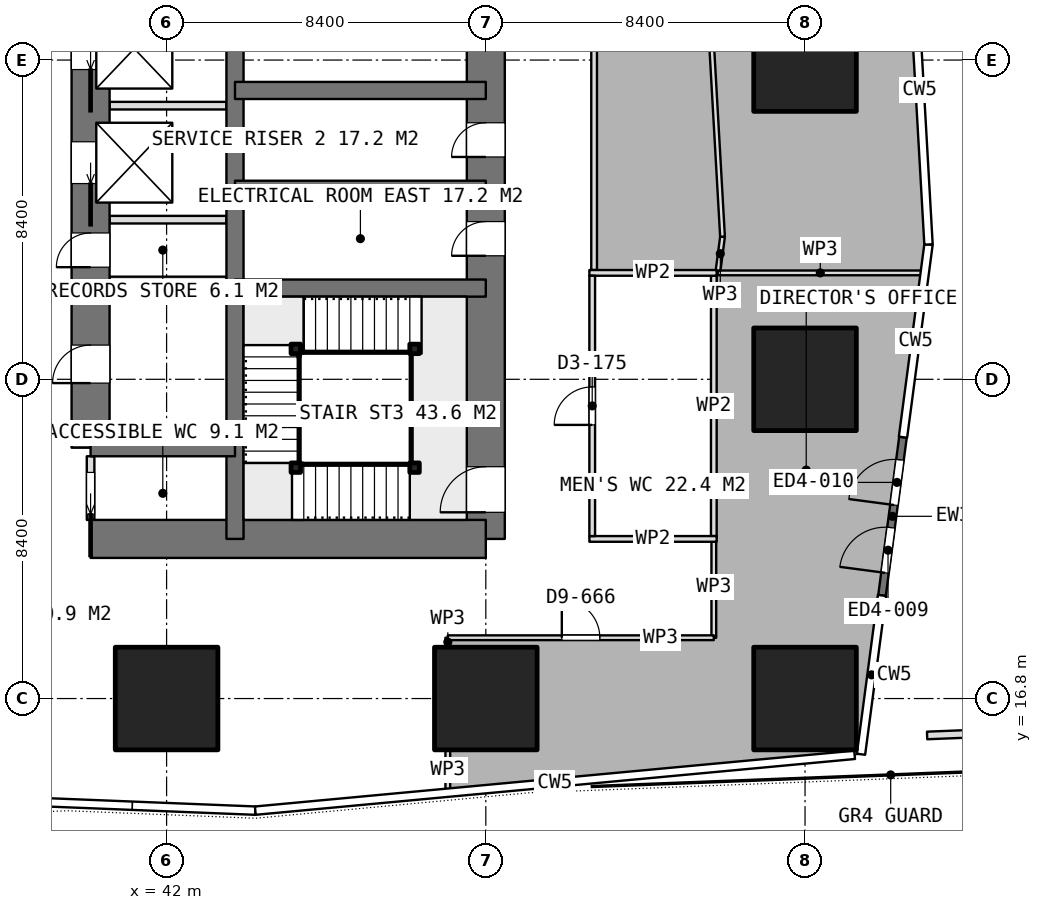
"""IFC4 building model, lengths in metres.
Left out: names, types, materials, properties, quantities, classifications, styles, units other than length and angle.
Written with IfcOpenShell. Run it as: python <this file> out.ifc"""

import sys

from ifc_helpers import new_model, si_unit, direction, frame, frame_2d, origin, origin_2d, place, context, subcontext, project, spatial, rectangle, extrude, element, fill, save


model = new_model("IFC4")
c1 = context("Model", 3, precision=1e-05, world=origin(), true_north=direction((0.0, 1.0)))
c2 = subcontext(c1, "Body", "Model", "MODEL_VIEW")
j1 = project(units=[si_unit("LENGTHUNIT", "METRE"), si_unit("PLANEANGLEUNIT", "RADIAN")], contexts=[c1])
p1 = place(None, origin())
s1 = spatial("IfcSite", under=j1, at=p1, CompositionType="ELEMENT")
p2 = place(p1, origin())
s2 = spatial("IfcBuilding", under=s1, at=p2, CompositionType="ELEMENT")
p3 = place(p2, frame((0.0, 0.0, 168.2)))
s3 = spatial("IfcBuildingStorey", under=s2, at=p3, CompositionType="ELEMENT", Elevation=168.2)
p4 = place(p3, frame((40.0, 21.0, 0.0), z_axis=(0.0, 0.0, 1.0), x_axis=(1.0, 0.0, 0.0)))
e1 = element("IfcWall", 1, at=p4, inside=s3, PredefinedType="SHEAR", context=c2, shape_type="SweptSolid", body=[
    extrude(rectangle(XDim=10.4, YDim=1.0, at=frame_2d((5.2, 0.0))), origin(), (0.0, 0.0, 1.0), 4.5),
])
p5 = place(p3, frame((50.4, 21.0, 0.0), z_axis=(0.0, 0.0, 1.0), x_axis=(0.0, 1.0, 0.0)))
e2 = element("IfcWall", 2, at=p5, inside=s3, PredefinedType="SHEAR", context=c2, shape_type="SweptSolid", body=[
    extrude(rectangle(XDim=25.2, YDim=1.0, at=frame_2d((12.6, 0.0))), origin(), (0.0, 0.0, 1.0), 4.5),
])
p6 = place(p5, frame((16.2, 0.0, 0.0)))
e3 = element("IfcOpeningElement", 3, at=p6, cuts=e2, PredefinedType="OPENING", context=c2, shape_type="SweptSolid", body=[
    extrude(rectangle(XDim=1.2, YDim=2.1, at=frame_2d((0.6, 1.05))), frame((0.0, 0.51, 0.0), z_axis=(0.0, -1.0, 0.0), x_axis=(1.0, 0.0, 0.0)), (0.0, 0.0, 1.0), 1.02),
])
p7 = place(p5, frame((10.05, 0.0, 0.0)))
e4 = element("IfcOpeningElement", 4, at=p7, cuts=e2, PredefinedType="OPENING", context=c2, shape_type="SweptSolid", body=[
    extrude(rectangle(XDim=0.9, YDim=2.1, at=frame_2d((0.45, 1.05))), frame((0.0, 0.51, 0.0), z_axis=(0.0, -1.0, 0.0), x_axis=(1.0, 0.0, 0.0)), (0.0, 0.0, 1.0), 1.02),
])
p8 = place(p5, frame((7.45, 0.0, 0.0)))
e5 = element("IfcOpeningElement", 5, at=p8, cuts=e2, PredefinedType="OPENING", context=c2, shape_type="SweptSolid", body=[
    extrude(rectangle(XDim=0.9, YDim=2.1, at=frame_2d((0.45, 1.05))), frame((0.0, 0.51, 0.0), z_axis=(0.0, -1.0, 0.0), x_axis=(1.0, 0.0, 0.0)), (0.0, 0.0, 1.0), 1.02),
])
p9 = place(p5, frame((0.7, 0.0, 0.0)))
e6 = element("IfcOpeningElement", 6, at=p9, cuts=e2, PredefinedType="OPENING", context=c2, shape_type="SweptSolid", body=[
    extrude(rectangle(XDim=1.2, YDim=2.1, at=frame_2d((0.6, 1.05))), frame((0.0, 0.51, 0.0), z_axis=(0.0, -1.0, 0.0), x_axis=(1.0, 0.0, 0.0)), (0.0, 0.0, 1.0), 1.02),
])
p10 = place(p3, frame((43.8, 21.0, 0.0), z_axis=(0.0, 0.0, 1.0), x_axis=(0.0, 1.0, 0.0)))
e7 = element("IfcWall", 7, at=p10, inside=s3, PredefinedType="SHEAR", context=c2, shape_type="SweptSolid", body=[
    extrude(rectangle(XDim=25.2, YDim=0.45, at=frame_2d((12.6, 0.0))), origin(), (0.0, 0.0, 1.0), 4.5),
])
p11 = place(p3, frame((40.0, 23.4, 0.0), z_axis=(0.0, 0.0, 1.0), x_axis=(0.0, 1.0, 0.0)))
e8 = element("IfcWall", 8, at=p11, inside=s3, PredefinedType="SHEAR", context=c2, shape_type="SweptSolid", body=[
    extrude(rectangle(XDim=18.0, YDim=1.0, at=frame_2d((9.0, 0.0))), origin(), (0.0, 0.0, 1.0), 4.5),
])
p12 = place(p11, frame((1.7, 0.0, 0.0)))
e9 = element("IfcOpeningElement", 9, at=p12, cuts=e8, PredefinedType="OPENING", context=c2, shape_type="SweptSolid", body=[
    extrude(rectangle(XDim=1.0, YDim=2.1, at=frame_2d((0.5, 1.05))), frame((0.0, 0.51, 0.0), z_axis=(0.0, -1.0, 0.0), x_axis=(1.0, 0.0, 0.0)), (0.0, 0.0, 1.0), 1.02),
])
p13 = place(p11, frame((4.75, 0.0, 0.0)))
e10 = element("IfcOpeningElement", 10, at=p13, cuts=e8, PredefinedType="OPENING", context=c2, shape_type="SweptSolid", body=[
    extrude(rectangle(XDim=0.9, YDim=2.1, at=frame_2d((0.45, 1.05))), frame((0.0, 0.51, 0.0), z_axis=(0.0, -1.0, 0.0), x_axis=(1.0, 0.0, 0.0)), (0.0, 0.0, 1.0), 1.02),
])
p14 = place(p11, frame((6.95, 0.0, 0.0)))
e11 = element("IfcOpeningElement", 11, at=p14, cuts=e8, PredefinedType="OPENING", context=c2, shape_type="SweptSolid", body=[
    extrude(rectangle(XDim=1.1, YDim=2.1, at=frame_2d((0.55, 1.05))), frame((0.0, 0.51, 0.0), z_axis=(0.0, -1.0, 0.0), x_axis=(1.0, 0.0, 0.0)), (0.0, 0.0, 1.0), 1.02),
])
p15 = place(p11, frame((9.95, 0.0, 0.0)))
e12 = element("IfcOpeningElement", 12, at=p15, cuts=e8, PredefinedType="OPENING", context=c2, shape_type="SweptSolid", body=[
    extrude(rectangle(XDim=1.1, YDim=2.1, at=frame_2d((0.55, 1.05))), frame((0.0, 0.51, 0.0), z_axis=(0.0, -1.0, 0.0), x_axis=(1.0, 0.0, 0.0)), (0.0, 0.0, 1.0), 1.02),
])
p16 = place(p3, frame((40.0, 23.4, 0.0), z_axis=(0.0, 0.0, 1.0), x_axis=(1.0, 0.0, 0.0)))
e13 = element("IfcWall", 13, at=p16, inside=s3, PredefinedType="SHEAR", context=c2, shape_type="SweptSolid", body=[
    extrude(rectangle(XDim=3.8, YDim=0.45, at=frame_2d((1.9, 0.0))), origin(), (0.0, 0.0, 1.0), 4.5),
])
for number, where, z_axis, x_axis in (
    (14, (43.8, 27.6, 0.0), (0.0, 0.0, 1.0), (1.0, 0.0, 0.0)),
    (15, (43.8, 30.2, 0.0), (0.0, 0.0, 1.0), (1.0, 0.0, 0.0)),
    (16, (43.8, 32.8, 0.0), (0.0, 0.0, 1.0), (1.0, 0.0, 0.0)),
):
    element("IfcWall", number, at=place(p3, frame(where, z_axis=z_axis, x_axis=x_axis)), inside=s3, PredefinedType="SHEAR", context=c2, shape_type="SweptSolid", body=[
        extrude(rectangle(XDim=6.6, YDim=0.45, at=frame_2d((3.3, 0.0))), origin(), (0.0, 0.0, 1.0), 4.5),
    ])
for number, where, z_axis, x_axis in (
    (17, (42.0, 16.8, 0.0), (0.0, 0.0, 1.0), (1.0, 0.0, 0.0)),
    (18, (50.4, 16.8, 0.0), (0.0, 0.0, 1.0), (1.0, 0.0, 0.0)),
    (19, (58.8, 16.8, 0.0), (0.0, 0.0, 1.0), (1.0, 0.0, 0.0)),
    (20, (58.8, 25.2, 0.0), (0.0, 0.0, 1.0), (1.0, 0.0, 0.0)),
    (21, (58.8, 33.6, 0.0), (0.0, 0.0, 1.0), (1.0, 0.0, 0.0)),
):
    element("IfcColumn", number, at=place(p3, frame(where, z_axis=z_axis, x_axis=x_axis)), inside=s3, PredefinedType="COLUMN", context=c2, shape_type="SweptSolid", body=[
        extrude(rectangle(XDim=2.7, YDim=2.7, at=origin_2d()), origin(), (0.0, 0.0, 1.0), 4.5),
    ])
p17 = place(p3, frame((60.826, 19.513, 0.0), z_axis=(0.0, 0.0, 1.0), x_axis=(0.131307007814, 0.991341752222, 0.0)))
e22 = element("IfcWall", 22, at=p17, inside=s3, PredefinedType="SOLIDWALL", context=c2, shape_type="SweptSolid", body=[
    extrude(rectangle(XDim=4.2, YDim=0.2, at=frame_2d((2.1, 0.0))), origin(), (0.0, 0.0, 1.0), 4.25),
])
p18 = place(p17, frame((0.6, 0.0, 0.0)))
e23 = element("IfcOpeningElement", 23, at=p18, cuts=e22, PredefinedType="OPENING", context=c2, shape_type="SweptSolid", body=[
    extrude(rectangle(XDim=1.2, YDim=2.4, at=frame_2d((0.6, 1.2))), frame((0.0, 0.11, 0.0), z_axis=(0.0, -1.0, 0.0), x_axis=(1.0, 0.0, 0.0)), (0.0, 0.0, 1.0), 0.22),
])
p19 = place(p17, frame((2.4, 0.0, 0.0)))
e24 = element("IfcOpeningElement", 24, at=p19, cuts=e22, PredefinedType="OPENING", context=c2, shape_type="SweptSolid", body=[
    extrude(rectangle(XDim=1.2, YDim=2.4, at=frame_2d((0.6, 1.2))), frame((0.0, 0.11, 0.0), z_axis=(0.0, -1.0, 0.0), x_axis=(1.0, 0.0, 0.0)), (0.0, 0.0, 1.0), 0.22),
])
p20 = place(p3, frame((62.013, 15.829, 0.0), z_axis=(0.0, 0.0, 1.0), x_axis=(0.999242772143, 0.038908640685, 0.0)))
e25 = element("IfcWall", 25, at=p20, inside=s3, PredefinedType="USERDEFINED", context=c2, shape_type="SweptSolid", body=[
    extrude(rectangle(XDim=5.955, YDim=0.2, at=frame_2d((2.977, 0.0))), origin(), (0.0, 0.0, 1.0), 0.6),
])
for number, where, z_axis, x_axis in (
    (26, (40.5, 29.4, 0.0), (0.0, 0.0, 1.0), (1.0, 0.0, 0.0)),
    (27, (40.5, 32.4, 0.0), (0.0, 0.0, 1.0), (1.0, 0.0, 0.0)),
):
    element("IfcWall", number, at=place(p3, frame(where, z_axis=z_axis, x_axis=x_axis)), inside=s3, PredefinedType="PARTITIONING", context=c2, shape_type="SweptSolid", body=[
        extrude(rectangle(XDim=3.075, YDim=0.2, at=frame_2d((1.538, 0.0))), origin(), (0.0, 0.0, 1.0), 4.25),
    ])
p21 = place(p3, frame((40.0, 21.5, 0.0), z_axis=(0.0, 0.0, 1.0), x_axis=(0.0, 1.0, 0.0)))
e28 = element("IfcWall", 28, at=p21, inside=s3, PredefinedType="PARTITIONING", context=c2, shape_type="SweptSolid", body=[
    extrude(rectangle(XDim=1.675, YDim=0.2, at=frame_2d((0.837, 0.0))), origin(), (0.0, 0.0, 1.0), 4.25),
])
p22 = place(p21, frame((0.15, 0.0, 0.0)))
e29 = element("IfcOpeningElement", 29, at=p22, cuts=e28, PredefinedType="OPENING", context=c2, shape_type="SweptSolid", body=[
    extrude(rectangle(XDim=1.1, YDim=2.1, at=frame_2d((0.55, 1.05))), frame((0.0, 0.11, 0.0), z_axis=(0.0, -1.0, 0.0), x_axis=(1.0, 0.0, 0.0)), (0.0, 0.0, 1.0), 0.22),
])
p23 = place(p3, frame((40.5, 27.8, 0.0), z_axis=(0.0, 0.0, 1.0), x_axis=(1.0, 0.0, 0.0)))
e30 = element("IfcWall", 30, at=p23, inside=s3, PredefinedType="PARTITIONING", context=c2, shape_type="SweptSolid", body=[
    extrude(rectangle(XDim=3.075, YDim=0.2, at=frame_2d((1.538, 0.0))), origin(), (0.0, 0.0, 1.0), 4.25),
])
for number, where, z_axis, x_axis in (
    (31, (53.125, 21.0, 0.0), (0.0, 0.0, 1.0), (1.0, 0.0, 0.0)),
    (32, (53.125, 28.0, 0.0), (0.0, 0.0, 1.0), (1.0, 0.0, 0.0)),
):
    element("IfcWall", number, at=place(p3, frame(where, z_axis=z_axis, x_axis=x_axis)), inside=s3, PredefinedType="PARTITIONING", context=c2, shape_type="SweptSolid", body=[
        extrude(rectangle(XDim=3.35, YDim=0.15, at=frame_2d((1.675, 0.0))), origin(), (0.0, 0.0, 1.0), 4.25),
    ])
p24 = place(p3, frame((53.2, 21.075, 0.0), z_axis=(0.0, 0.0, 1.0), x_axis=(0.0, 1.0, 0.0)))
e33 = element("IfcWall", 33, at=p24, inside=s3, PredefinedType="PARTITIONING", context=c2, shape_type="SweptSolid", body=[
    extrude(rectangle(XDim=6.85, YDim=0.15, at=frame_2d((3.425, 0.0))), origin(), (0.0, 0.0, 1.0), 4.25),
])
p25 = place(p24, frame((2.925, 0.0, 0.0)))
e34 = element("IfcOpeningElement", 34, at=p25, cuts=e33, PredefinedType="OPENING", context=c2, shape_type="SweptSolid", body=[
    extrude(rectangle(XDim=1.0, YDim=2.1, at=frame_2d((0.5, 1.05))), frame((0.0, 0.085, 0.0), z_axis=(0.0, -1.0, 0.0), x_axis=(1.0, 0.0, 0.0)), (0.0, 0.0, 1.0), 0.17),
])
p26 = place(p3, frame((56.4, 21.075, 0.0), z_axis=(0.0, 0.0, 1.0), x_axis=(0.0, 1.0, 0.0)))
e35 = element("IfcWall", 35, at=p26, inside=s3, PredefinedType="PARTITIONING", context=c2, shape_type="SweptSolid", body=[
    extrude(rectangle(XDim=6.85, YDim=0.15, at=frame_2d((3.425, 0.0))), origin(), (0.0, 0.0, 1.0), 4.25),
])
p27 = place(p3, frame((56.4, 18.4, 0.0), z_axis=(0.0, 0.0, 1.0), x_axis=(0.0, 1.0, 0.0)))
e36 = element("IfcWall", 36, at=p27, inside=s3, PredefinedType="PARTITIONING", context=c2, shape_type="SweptSolid", body=[
    extrude(rectangle(XDim=2.675, YDim=0.125, at=frame_2d((1.337, 0.0))), origin(), (0.0, 0.0, 1.0), 4.25),
])
p28 = place(p3, frame((56.503, 28.0, 0.0), z_axis=(0.0, 0.0, 1.0), x_axis=(1.0, 0.0, 0.0)))
e37 = element("IfcWall", 37, at=p28, inside=s3, PredefinedType="PARTITIONING", context=c2, shape_type="SweptSolid", body=[
    extrude(rectangle(XDim=5.397, YDim=0.125, at=frame_2d((2.698, 0.0))), origin(), (0.0, 0.0, 1.0), 4.25),
])
p29 = place(p3, frame((49.4, 14.402, 0.0), z_axis=(0.0, 0.0, 1.0), x_axis=(0.0, 1.0, 0.0)))
e38 = element("IfcWall", 38, at=p29, inside=s3, PredefinedType="PARTITIONING", context=c2, shape_type="SweptSolid", body=[
    extrude(rectangle(XDim=1.028, YDim=0.125, at=frame_2d((0.514, 0.0))), origin(), (0.0, 0.0, 1.0), 4.25),
])
p30 = place(p3, frame((49.4, 18.17, 0.0), z_axis=(0.0, 0.0, 1.0), x_axis=(0.0, 1.0, 0.0)))
e39 = element("IfcWall", 39, at=p30, inside=s3, PredefinedType="PARTITIONING", context=c2, shape_type="SweptSolid", body=[
    extrude(rectangle(XDim=0.23, YDim=0.125, at=frame_2d((0.115, 0.0))), origin(), (0.0, 0.0, 1.0), 4.25),
])
p31 = place(p3, frame((49.4, 18.4, 0.0), z_axis=(0.0, 0.0, 1.0), x_axis=(1.0, 0.0, 0.0)))
e40 = element("IfcWall", 40, at=p31, inside=s3, PredefinedType="PARTITIONING", context=c2, shape_type="SweptSolid", body=[
    extrude(rectangle(XDim=7.0, YDim=0.125, at=frame_2d((3.5, 0.0))), origin(), (0.0, 0.0, 1.0), 4.25),
])
p32 = place(p31, frame((3.0, 0.0, 0.0)))
e41 = element("IfcOpeningElement", 41, at=p32, cuts=e40, PredefinedType="OPENING", context=c2, shape_type="SweptSolid", body=[
    extrude(rectangle(XDim=1.0, YDim=2.1, at=frame_2d((0.5, 1.05))), frame((0.0, 0.073, 0.0), z_axis=(0.0, -1.0, 0.0), x_axis=(1.0, 0.0, 0.0)), (0.0, 0.0, 1.0), 0.145),
])
p33 = place(p3, frame((56.512, 28.062, 0.0), z_axis=(0.0, 0.0, 1.0), x_axis=(0.130433380751, 0.991457075816, 0.0)))
e42 = element("IfcWall", 42, at=p33, inside=s3, PredefinedType="PARTITIONING", context=c2, shape_type="SweptSolid", body=[
    extrude(rectangle(XDim=0.896, YDim=0.125, at=frame_2d((0.448, 0.0))), origin(), (0.0, 0.0, 1.0), 4.25),
])
p34 = place(p3, frame((56.629, 28.951, 0.0), z_axis=(0.0, 0.0, 1.0), x_axis=(-0.056721758154, 0.998390025066, 0.0)))
e43 = element("IfcWall", 43, at=p34, inside=s3, PredefinedType="PARTITIONING", context=c2, shape_type="SweptSolid", body=[
    extrude(rectangle(XDim=6.168, YDim=0.125, at=frame_2d((3.084, 0.0))), origin(), (0.0, 0.0, 1.0), 4.25),
])
p35 = place(p3, frame((53.25, 28.075, 0.0), z_axis=(0.0, 0.0, 1.0), x_axis=(0.0, 1.0, 0.0)))
e44 = element("IfcWall", 44, at=p35, inside=s3, PredefinedType="PARTITIONING", context=c2, shape_type="SweptSolid", body=[
    extrude(rectangle(XDim=25.175, YDim=0.15, at=frame_2d((12.587, 0.0))), origin(), (0.0, 0.0, 1.0), 4.25),
])
p36 = place(p35, frame((12.051, 0.0, 0.0)))
e45 = element("IfcOpeningElement", 45, at=p36, cuts=e44, PredefinedType="OPENING", context=c2, shape_type="SweptSolid", body=[
    extrude(rectangle(XDim=1.0, YDim=2.1, at=frame_2d((0.5, 1.05))), frame((0.0, 0.085, 0.0), z_axis=(0.0, -1.0, 0.0), x_axis=(1.0, 0.0, 0.0)), (0.0, 0.0, 1.0), 0.17),
])
for number, where, z_axis, x_axis in (
    (46, (48.525, 22.875, 0.0), (0.0, 0.0, 1.0), (1.0, 0.0, 0.0)),
    (47, (45.4, 22.875, 0.0), (0.0, 0.0, 1.0), (1.0, 0.0, 0.0)),
    (48, (45.4, 26.0, 0.0), (0.0, 0.0, 1.0), (1.0, 0.0, 0.0)),
    (49, (48.525, 26.0, 0.0), (0.0, 0.0, 1.0), (1.0, 0.0, 0.0)),
):
    element("IfcColumn", number, at=place(p3, frame(where, z_axis=z_axis, x_axis=x_axis)), inside=s3, PredefinedType="COLUMN", context=c2, shape_type="SweptSolid", body=[
        extrude(rectangle(XDim=0.25, YDim=0.25, at=origin_2d()), origin(), (0.0, 0.0, 1.0), 4.5),
    ])
p37 = place(p18, origin())
e50 = element("IfcDoor", 50, at=p37, inside=s3, OperationType="SINGLE_SWING_LEFT", PredefinedType="DOOR", context=c2, shape_type="SweptSolid", body=[
    extrude(rectangle(XDim=1.2, YDim=2.4, at=frame_2d((0.6, 1.2))), frame((0.0, 0.025, 0.0), z_axis=(0.0, -1.0, 0.0), x_axis=(1.0, 0.0, 0.0)), (0.0, 0.0, 1.0), 0.05),
])
fill(e23, e50)
p38 = place(p19, origin())
e51 = element("IfcDoor", 51, at=p38, inside=s3, OperationType="SINGLE_SWING_LEFT", PredefinedType="DOOR", context=c2, shape_type="SweptSolid", body=[
    extrude(rectangle(XDim=1.2, YDim=2.4, at=frame_2d((0.6, 1.2))), frame((0.0, 0.025, 0.0), z_axis=(0.0, -1.0, 0.0), x_axis=(1.0, 0.0, 0.0)), (0.0, 0.0, 1.0), 0.05),
])
fill(e24, e51)
p39 = place(p7, origin())
e52 = element("IfcDoor", 52, at=p39, inside=s3, OperationType="SINGLE_SWING_LEFT", PredefinedType="DOOR", context=c2, shape_type="SweptSolid", body=[
    extrude(rectangle(XDim=0.9, YDim=2.1, at=frame_2d((0.45, 1.05))), frame((0.0, 0.025, 0.0), z_axis=(0.0, -1.0, 0.0), x_axis=(1.0, 0.0, 0.0)), (0.0, 0.0, 1.0), 0.05),
])
fill(e4, e52)
p40 = place(p8, origin())
e53 = element("IfcDoor", 53, at=p40, inside=s3, OperationType="SINGLE_SWING_LEFT", PredefinedType="DOOR", context=c2, shape_type="SweptSolid", body=[
    extrude(rectangle(XDim=0.9, YDim=2.1, at=frame_2d((0.45, 1.05))), frame((0.0, 0.025, 0.0), z_axis=(0.0, -1.0, 0.0), x_axis=(1.0, 0.0, 0.0)), (0.0, 0.0, 1.0), 0.05),
])
fill(e5, e53)
p41 = place(p22, origin())
e54 = element("IfcDoor", 54, at=p41, inside=s3, OperationType="SLIDING_TO_LEFT", PredefinedType="DOOR", context=c2, shape_type="SweptSolid", body=[
    extrude(rectangle(XDim=1.1, YDim=2.1, at=frame_2d((0.55, 1.05))), frame((0.0, 0.025, 0.0), z_axis=(0.0, -1.0, 0.0), x_axis=(1.0, 0.0, 0.0)), (0.0, 0.0, 1.0), 0.05),
])
fill(e29, e54)
p42 = place(p12, origin())
e55 = element("IfcDoor", 55, at=p42, inside=s3, OperationType="SINGLE_SWING_LEFT", PredefinedType="DOOR", context=c2, shape_type="SweptSolid", body=[
    extrude(rectangle(XDim=1.0, YDim=2.1, at=frame_2d((0.5, 1.05))), frame((0.0, 0.025, 0.0), z_axis=(0.0, -1.0, 0.0), x_axis=(1.0, 0.0, 0.0)), (0.0, 0.0, 1.0), 0.05),
])
fill(e9, e55)
p43 = place(p13, origin())
e56 = element("IfcDoor", 56, at=p43, inside=s3, OperationType="SINGLE_SWING_LEFT", PredefinedType="DOOR", context=c2, shape_type="SweptSolid", body=[
    extrude(rectangle(XDim=0.9, YDim=2.1, at=frame_2d((0.45, 1.05))), frame((0.0, 0.025, 0.0), z_axis=(0.0, -1.0, 0.0), x_axis=(1.0, 0.0, 0.0)), (0.0, 0.0, 1.0), 0.05),
])
fill(e10, e56)
p44 = place(p14, origin())
e57 = element("IfcDoor", 57, at=p44, inside=s3, OperationType="SLIDING_TO_LEFT", PredefinedType="USERDEFINED", context=c2, shape_type="SweptSolid", body=[
    extrude(rectangle(XDim=1.1, YDim=2.1, at=frame_2d((0.55, 1.05))), frame((0.0, 0.025, 0.0), z_axis=(0.0, -1.0, 0.0), x_axis=(1.0, 0.0, 0.0)), (0.0, 0.0, 1.0), 0.05),
])
fill(e11, e57)
p45 = place(p15, origin())
e58 = element("IfcDoor", 58, at=p45, inside=s3, OperationType="SLIDING_TO_LEFT", PredefinedType="USERDEFINED", context=c2, shape_type="SweptSolid", body=[
    extrude(rectangle(XDim=1.1, YDim=2.1, at=frame_2d((0.55, 1.05))), frame((0.0, 0.025, 0.0), z_axis=(0.0, -1.0, 0.0), x_axis=(1.0, 0.0, 0.0)), (0.0, 0.0, 1.0), 0.05),
])
fill(e12, e58)
p46 = place(p25, origin())
e59 = element("IfcDoor", 59, at=p46, inside=s3, OperationType="SINGLE_SWING_LEFT", PredefinedType="DOOR", context=c2, shape_type="SweptSolid", body=[
    extrude(rectangle(XDim=1.0, YDim=2.1, at=frame_2d((0.5, 1.05))), frame((0.0, 0.025, 0.0), z_axis=(0.0, -1.0, 0.0), x_axis=(1.0, 0.0, 0.0)), (0.0, 0.0, 1.0), 0.05),
])
fill(e34, e59)
p47 = place(p32, origin())
e60 = element("IfcDoor", 60, at=p47, inside=s3, OperationType="SINGLE_SWING_LEFT", PredefinedType="DOOR", context=c2, shape_type="SweptSolid", body=[
    extrude(rectangle(XDim=1.0, YDim=2.1, at=frame_2d((0.5, 1.05))), frame((0.0, 0.025, 0.0), z_axis=(0.0, -1.0, 0.0), x_axis=(1.0, 0.0, 0.0)), (0.0, 0.0, 1.0), 0.05),
])
fill(e41, e60)
p48 = place(p9, origin())
e61 = element("IfcDoor", 61, at=p48, inside=s3, OperationType="SINGLE_SWING_RIGHT", PredefinedType="DOOR", context=c2, shape_type="SweptSolid", body=[
    extrude(rectangle(XDim=1.2, YDim=2.1, at=frame_2d((0.6, 1.05))), frame((0.0, 0.025, 0.0), z_axis=(0.0, -1.0, 0.0), x_axis=(1.0, 0.0, 0.0)), (0.0, 0.0, 1.0), 0.05),
])
fill(e6, e61)
save(model, sys.argv[1])
